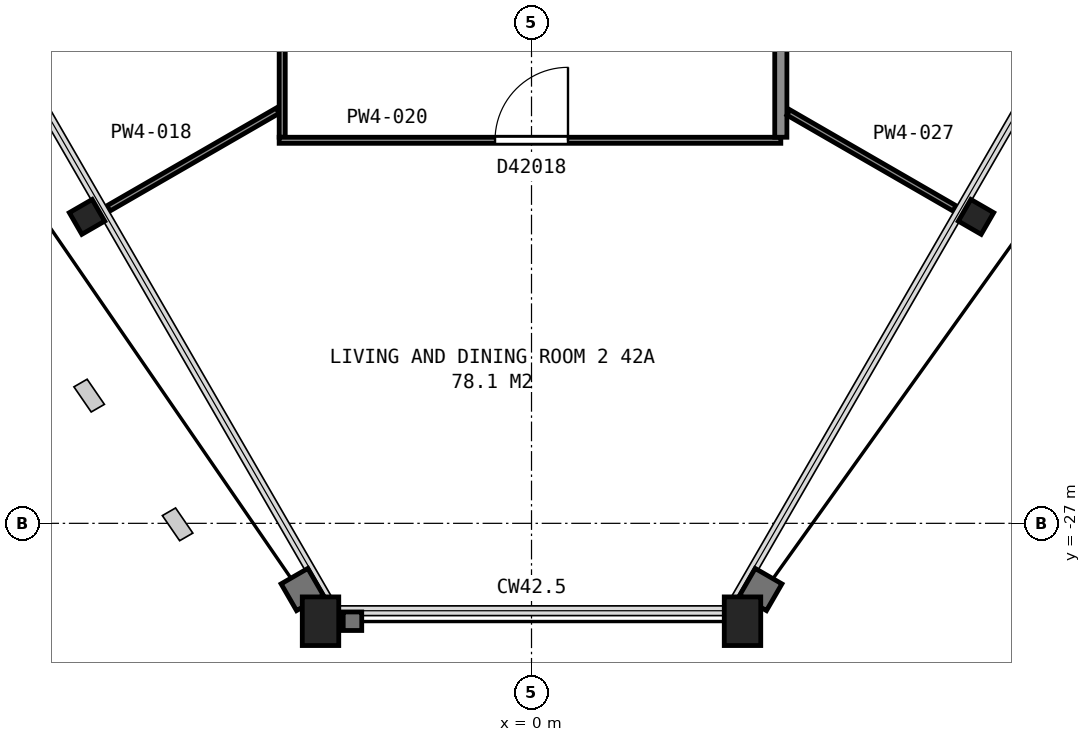
"""IFC4 building model, lengths in metres.
Left out: names, types, materials, properties, quantities, classifications, styles, units other than length and angle.
Written with IfcOpenShell. Run it as: python <this file> out.ifc"""

import sys

from ifc_helpers import new_model, si_unit, direction, frame, frame_2d, origin, origin_2d, place, context, subcontext, project, spatial, rectangle, hollow_rectangle, i_section, extrude, element, fill, save


model = new_model("IFC4")
c1 = context("Model", 3, precision=1e-05, world=origin(), true_north=direction((0.0, 1.0)))
c2 = subcontext(c1, "Body", "Model", "MODEL_VIEW")
j1 = project(units=[si_unit("LENGTHUNIT", "METRE"), si_unit("PLANEANGLEUNIT", "RADIAN")], contexts=[c1])
p1 = place(None, origin())
s1 = spatial("IfcSite", under=j1, at=p1, CompositionType="ELEMENT")
p2 = place(p1, origin())
s2 = spatial("IfcBuilding", under=s1, at=p2, CompositionType="ELEMENT")
p3 = place(p2, frame((0.0, 0.0, 171.0)))
s3 = spatial("IfcBuildingStorey", under=s2, at=p3, CompositionType="ELEMENT", Elevation=171.0)
p4 = place(p3, frame((-7.31, -21.96, 0.0), z_axis=(0.0, 0.0, 1.0), x_axis=(-0.5, 0.866025403784, 0.0)))
e1 = element("IfcColumn", 1, at=p4, inside=s3, PredefinedType="COLUMN", context=c2, shape_type="SweptSolid", body=[
    extrude(i_section(OverallWidth=0.411, OverallDepth=0.434, WebThickness=0.036, FlangeThickness=0.057, FilletRadius=0.015, at=origin_2d()), origin(), (0.0, 0.0, 1.0), 3.66),
])
for number, where, z_axis, x_axis in (
    (2, (-3.47, -28.61, 0.0), (0.0, 0.0, 1.0), (-1.0, 0.0, 0.0)),
    (3, (3.47, -28.61, 0.0), (0.0, 0.0, 1.0), (-1.0, 0.0, 0.0)),
):
    element("IfcColumn", number, at=place(p3, frame(where, z_axis=z_axis, x_axis=x_axis)), inside=s3, PredefinedType="COLUMN", context=c2, shape_type="SweptSolid", body=[
        extrude(hollow_rectangle(XDim=0.6, YDim=0.8, WallThickness=0.05, at=origin_2d()), origin(), (0.0, 0.0, 1.0), 3.635),
    ])
p5 = place(p3, frame((7.31, -21.96, 0.0), z_axis=(0.0, 0.0, 1.0), x_axis=(-0.5, -0.866025403784, 0.0)))
e4 = element("IfcColumn", 4, at=p5, inside=s3, PredefinedType="COLUMN", context=c2, shape_type="SweptSolid", body=[
    extrude(i_section(OverallWidth=0.411, OverallDepth=0.434, WebThickness=0.036, FlangeThickness=0.057, FilletRadius=0.015, at=origin_2d()), origin(), (0.0, 0.0, 1.0), 3.66),
])
p6 = place(p3, frame((-6.958, -21.82, 0.0), z_axis=(0.0, 0.0, 1.0), x_axis=(0.86602741148, 0.499996522553, 0.0)))
e5 = element("IfcWall", 5, at=p6, inside=s3, PredefinedType="PARTITIONING", context=c2, shape_type="SweptSolid", body=[
    extrude(rectangle(XDim=3.213, YDim=0.1, at=frame_2d((1.606, 0.0))), origin(), (0.0, 0.0, 1.0), 2.713),
])
p7 = place(p3, frame((-4.1, -20.65, 0.0), z_axis=(0.0, 0.0, 1.0), x_axis=(0.0, 1.0, 0.0)))
e6 = element("IfcWall", 6, at=p7, inside=s3, PredefinedType="PARTITIONING", context=c2, shape_type="SweptSolid", body=[
    extrude(rectangle(XDim=8.063, YDim=0.1, at=frame_2d((4.031, 0.0))), origin(), (0.0, 0.0, 1.0), 2.713),
])
p8 = place(p7, frame((6.895, 0.0, 0.0)))
e7 = element("IfcOpeningElement", 7, at=p8, cuts=e6, PredefinedType="OPENING", context=c2, shape_type="SweptSolid", body=[
    extrude(rectangle(XDim=0.9, YDim=2.1, at=frame_2d((0.45, 1.05))), frame((0.0, 0.06, 0.0), z_axis=(0.0, -1.0, 0.0), x_axis=(1.0, 0.0, 0.0)), (0.0, 0.0, 1.0), 0.12),
])
p9 = place(p7, frame((3.08, 0.0, 0.0)))
e8 = element("IfcOpeningElement", 8, at=p9, cuts=e6, PredefinedType="OPENING", context=c2, shape_type="SweptSolid", body=[
    extrude(rectangle(XDim=0.9, YDim=2.1, at=frame_2d((0.45, 1.05))), frame((0.0, 0.06, 0.0), z_axis=(0.0, -1.0, 0.0), x_axis=(1.0, 0.0, 0.0)), (0.0, 0.0, 1.0), 0.12),
])
p10 = place(p3, frame((4.1, -20.7, 0.0), z_axis=(0.0, 0.0, 1.0), x_axis=(-1.0, 0.0, 0.0)))
e9 = element("IfcWall", 9, at=p10, inside=s3, PredefinedType="PARTITIONING", context=c2, shape_type="SweptSolid", body=[
    extrude(rectangle(XDim=8.25, YDim=0.1, at=frame_2d((4.125, 0.0))), origin(), (0.0, 0.0, 1.0), 2.713),
])
p11 = place(p10, frame((3.5, 0.0, 0.0)))
e10 = element("IfcOpeningElement", 10, at=p11, cuts=e9, PredefinedType="OPENING", context=c2, shape_type="SweptSolid", body=[
    extrude(rectangle(XDim=1.2, YDim=2.1, at=frame_2d((0.6, 1.05))), frame((0.0, 0.06, 0.0), z_axis=(0.0, -1.0, 0.0), x_axis=(1.0, 0.0, 0.0)), (0.0, 0.0, 1.0), 0.12),
])
p12 = place(p3, frame((4.1, -12.637, 0.0), z_axis=(0.0, 0.0, 1.0), x_axis=(0.0, -1.0, 0.0)))
e11 = element("IfcWall", 11, at=p12, inside=s3, PredefinedType="PARTITIONING", context=c2, shape_type="SweptSolid", body=[
    extrude(rectangle(XDim=8.013, YDim=0.2, at=frame_2d((4.006, 0.0))), origin(), (0.0, 0.0, 1.0), 2.713),
])
p13 = place(p12, frame((4.233, 0.0, 0.0)))
e12 = element("IfcOpeningElement", 12, at=p13, cuts=e11, PredefinedType="OPENING", context=c2, shape_type="SweptSolid", body=[
    extrude(rectangle(XDim=0.9, YDim=2.1, at=frame_2d((0.45, 1.05))), frame((0.0, 0.11, 0.0), z_axis=(0.0, -1.0, 0.0), x_axis=(1.0, 0.0, 0.0)), (0.0, 0.0, 1.0), 0.22),
])
p14 = place(p3, frame((4.225, -20.242, 0.0), z_axis=(0.0, 0.0, 1.0), x_axis=(0.866015493058, -0.500017165488, 0.0)))
e13 = element("IfcWall", 13, at=p14, inside=s3, PredefinedType="PARTITIONING", context=c2, shape_type="SweptSolid", body=[
    extrude(rectangle(XDim=3.155, YDim=0.1, at=frame_2d((1.578, 0.0))), origin(), (0.0, 0.0, 1.0), 2.713),
])
p15 = place(p11, origin())
e14 = element("IfcDoor", 14, at=p15, inside=s3, OperationType="SINGLE_SWING_LEFT", PredefinedType="DOOR", context=c2, shape_type="SweptSolid", body=[
    extrude(rectangle(XDim=1.2, YDim=2.1, at=frame_2d((0.6, 1.05))), frame((0.0, 0.025, 0.0), z_axis=(0.0, -1.0, 0.0), x_axis=(1.0, 0.0, 0.0)), (0.0, 0.0, 1.0), 0.05),
])
fill(e10, e14)
save(model, sys.argv[1])
